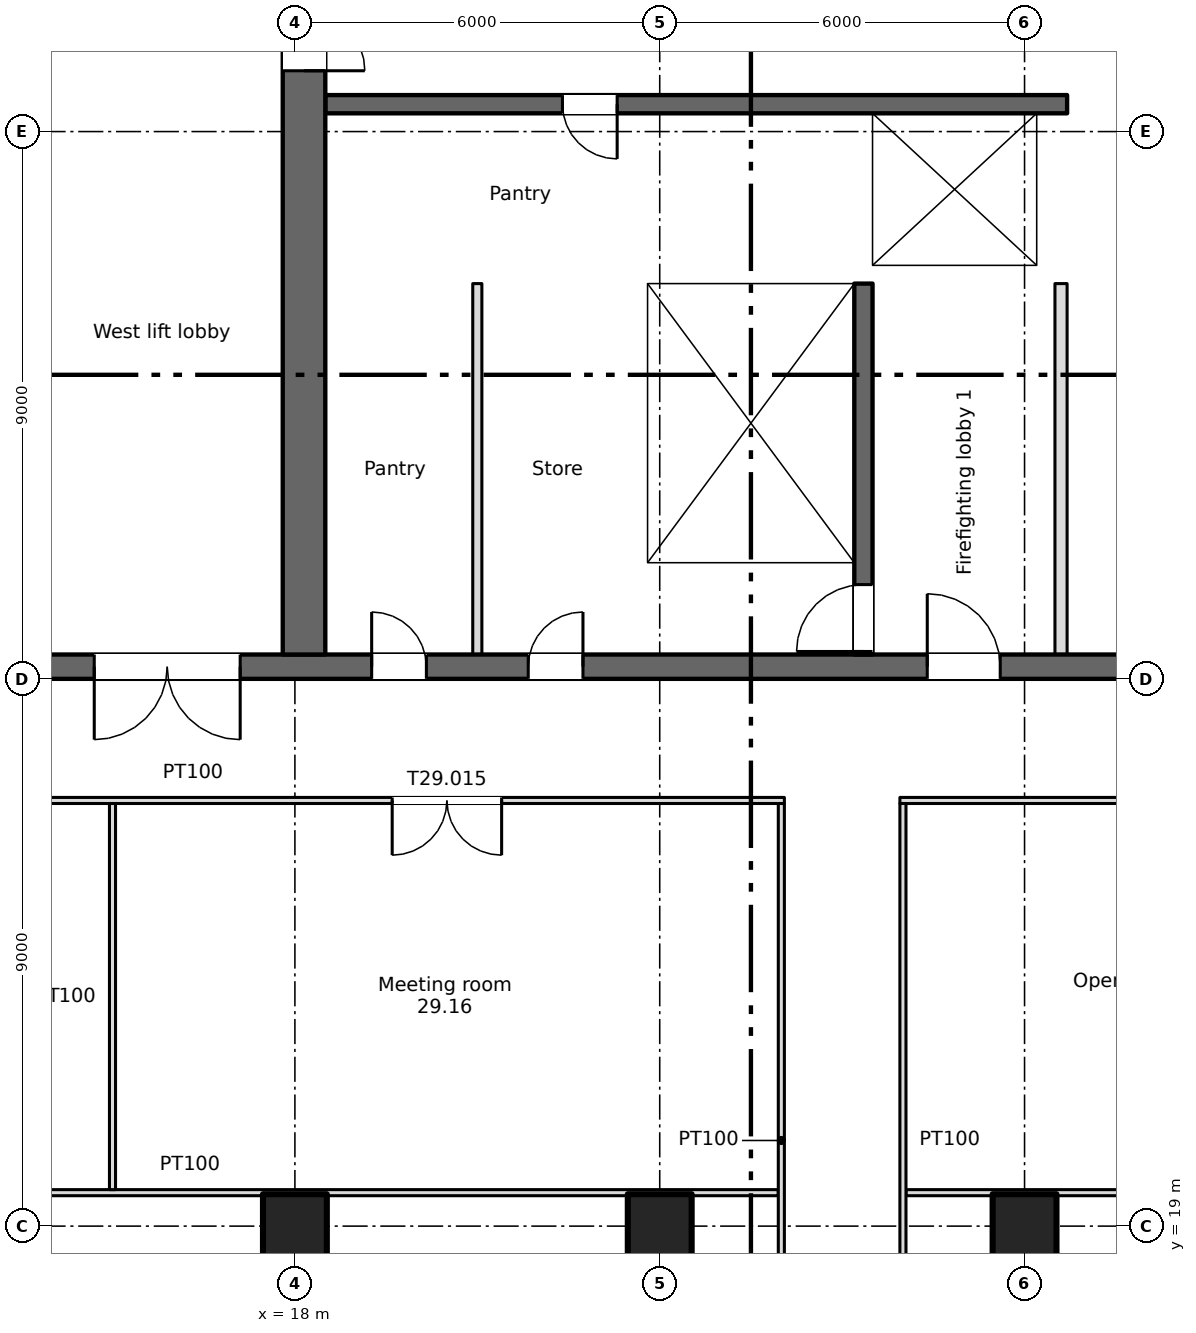
"""IFC4 building model, lengths in metres.
Left out: names, types, materials, properties, quantities, classifications, styles, units other than length and angle.
Written with IfcOpenShell. Run it as: python <this file> out.ifc"""

import sys

from ifc_helpers import new_model, si_unit, direction, frame, frame_2d, origin, origin_2d, place, context, subcontext, project, spatial, rectangle, extrude, element, fill, save


model = new_model("IFC4")
c1 = context("Model", 3, precision=1e-05, world=origin(), true_north=direction((0.0, 1.0)))
c2 = subcontext(c1, "Body", "Model", "MODEL_VIEW")
j1 = project(units=[si_unit("LENGTHUNIT", "METRE"), si_unit("PLANEANGLEUNIT", "RADIAN")], contexts=[c1])
p1 = place(None, origin())
s1 = spatial("IfcSite", under=j1, at=p1, CompositionType="ELEMENT")
p2 = place(p1, origin())
s2 = spatial("IfcBuilding", under=s1, at=p2, CompositionType="ELEMENT")
p3 = place(p2, frame((0.0, 0.0, 204.25)))
s3 = spatial("IfcBuildingStorey", under=s2, at=p3, CompositionType="ELEMENT", Elevation=204.25)
for number, where, z_axis, x_axis in (
    (1, (18.0, 19.0, 0.0), (0.0, 0.0, 1.0), (1.0, 0.0, 0.0)),
    (2, (24.0, 19.0, 0.0), (0.0, 0.0, 1.0), (1.0, 0.0, 0.0)),
    (3, (30.0, 19.0, 0.0), (0.0, 0.0, 1.0), (1.0, 0.0, 0.0)),
):
    element("IfcColumn", number, at=place(p3, frame(where, z_axis=z_axis, x_axis=x_axis)), inside=s3, PredefinedType="COLUMN", context=c2, shape_type="SweptSolid", body=[
        extrude(rectangle(XDim=1.05, YDim=1.05, at=origin_2d()), origin(), (0.0, 0.0, 1.0), 3.35),
    ])
p4 = place(p3, frame((6.6, 28.2, 0.0), z_axis=(0.0, 0.0, 1.0), x_axis=(1.0, 0.0, 0.0)))
e4 = element("IfcWall", 4, at=p4, inside=s3, PredefinedType="SHEAR", context=c2, shape_type="SweptSolid", body=[
    extrude(rectangle(XDim=57.9, YDim=0.4, at=frame_2d((28.95, 0.0))), origin(), (0.0, 0.0, 1.0), 3.35),
])
p5 = place(p4, frame((12.663, 0.0, 0.0)))
e5 = element("IfcOpeningElement", 5, at=p5, cuts=e4, PredefinedType="OPENING", context=c2, shape_type="SweptSolid", body=[
    extrude(rectangle(XDim=0.9, YDim=2.1, at=frame_2d((0.45, 1.05))), frame((0.0, 0.21, 0.0), z_axis=(0.0, -1.0, 0.0), x_axis=(1.0, 0.0, 0.0)), (0.0, 0.0, 1.0), 0.42),
])
p6 = place(p4, frame((15.238, 0.0, 0.0)))
e6 = element("IfcOpeningElement", 6, at=p6, cuts=e4, PredefinedType="OPENING", context=c2, shape_type="SweptSolid", body=[
    extrude(rectangle(XDim=0.9, YDim=2.1, at=frame_2d((0.45, 1.05))), frame((0.0, 0.21, 0.0), z_axis=(0.0, -1.0, 0.0), x_axis=(1.0, 0.0, 0.0)), (0.0, 0.0, 1.0), 0.42),
])
p7 = place(p4, frame((49.95, 0.0, 0.0)))
e7 = element("IfcOpeningElement", 7, at=p7, cuts=e4, PredefinedType="OPENING", context=c2, shape_type="SweptSolid", body=[
    extrude(rectangle(XDim=0.9, YDim=2.1, at=frame_2d((0.45, 1.05))), frame((0.0, 0.21, 0.0), z_axis=(0.0, -1.0, 0.0), x_axis=(1.0, 0.0, 0.0)), (0.0, 0.0, 1.0), 0.42),
])
p8 = place(p4, frame((0.663, 0.0, 0.0)))
e8 = element("IfcOpeningElement", 8, at=p8, cuts=e4, PredefinedType="OPENING", context=c2, shape_type="SweptSolid", body=[
    extrude(rectangle(XDim=0.9, YDim=2.1, at=frame_2d((0.45, 1.05))), frame((0.0, 0.21, 0.0), z_axis=(0.0, -1.0, 0.0), x_axis=(1.0, 0.0, 0.0)), (0.0, 0.0, 1.0), 0.42),
])
p9 = place(p4, frame((2.238, 0.0, 0.0)))
e9 = element("IfcOpeningElement", 9, at=p9, cuts=e4, PredefinedType="OPENING", context=c2, shape_type="SweptSolid", body=[
    extrude(rectangle(XDim=0.9, YDim=2.1, at=frame_2d((0.45, 1.05))), frame((0.0, 0.21, 0.0), z_axis=(0.0, -1.0, 0.0), x_axis=(1.0, 0.0, 0.0)), (0.0, 0.0, 1.0), 0.42),
])
p10 = place(p4, frame((4.8, 0.0, 0.0)))
e10 = element("IfcOpeningElement", 10, at=p10, cuts=e4, PredefinedType="OPENING", context=c2, shape_type="SweptSolid", body=[
    extrude(rectangle(XDim=1.2, YDim=2.1, at=frame_2d((0.6, 1.05))), frame((0.0, 0.21, 0.0), z_axis=(0.0, -1.0, 0.0), x_axis=(1.0, 0.0, 0.0)), (0.0, 0.0, 1.0), 0.42),
])
p11 = place(p4, frame((31.8, 0.0, 0.0)))
e11 = element("IfcOpeningElement", 11, at=p11, cuts=e4, PredefinedType="OPENING", context=c2, shape_type="SweptSolid", body=[
    extrude(rectangle(XDim=1.2, YDim=2.1, at=frame_2d((0.6, 1.05))), frame((0.0, 0.21, 0.0), z_axis=(0.0, -1.0, 0.0), x_axis=(1.0, 0.0, 0.0)), (0.0, 0.0, 1.0), 0.42),
])
p12 = place(p4, frame((55.3, 0.0, 0.0)))
e12 = element("IfcOpeningElement", 12, at=p12, cuts=e4, PredefinedType="OPENING", context=c2, shape_type="SweptSolid", body=[
    extrude(rectangle(XDim=1.2, YDim=2.1, at=frame_2d((0.6, 1.05))), frame((0.0, 0.21, 0.0), z_axis=(0.0, -1.0, 0.0), x_axis=(1.0, 0.0, 0.0)), (0.0, 0.0, 1.0), 0.42),
])
p13 = place(p4, frame((21.8, 0.0, 0.0)))
e13 = element("IfcOpeningElement", 13, at=p13, cuts=e4, PredefinedType="OPENING", context=c2, shape_type="SweptSolid", body=[
    extrude(rectangle(XDim=1.2, YDim=2.1, at=frame_2d((0.6, 1.05))), frame((0.0, 0.21, 0.0), z_axis=(0.0, -1.0, 0.0), x_axis=(1.0, 0.0, 0.0)), (0.0, 0.0, 1.0), 0.42),
])
p14 = place(p4, frame((41.8, 0.0, 0.0)))
e14 = element("IfcOpeningElement", 14, at=p14, cuts=e4, PredefinedType="OPENING", context=c2, shape_type="SweptSolid", body=[
    extrude(rectangle(XDim=1.2, YDim=2.1, at=frame_2d((0.6, 1.05))), frame((0.0, 0.21, 0.0), z_axis=(0.0, -1.0, 0.0), x_axis=(1.0, 0.0, 0.0)), (0.0, 0.0, 1.0), 0.42),
])
p15 = place(p4, frame((24.95, 0.0, 0.0)))
e15 = element("IfcOpeningElement", 15, at=p15, cuts=e4, PredefinedType="OPENING", context=c2, shape_type="SweptSolid", body=[
    extrude(rectangle(XDim=2.4, YDim=2.1, at=frame_2d((1.2, 1.05))), frame((0.0, 0.21, 0.0), z_axis=(0.0, -1.0, 0.0), x_axis=(1.0, 0.0, 0.0)), (0.0, 0.0, 1.0), 0.42),
])
p16 = place(p4, frame((37.45, 0.0, 0.0)))
e16 = element("IfcOpeningElement", 16, at=p16, cuts=e4, PredefinedType="OPENING", context=c2, shape_type="SweptSolid", body=[
    extrude(rectangle(XDim=2.4, YDim=2.1, at=frame_2d((1.2, 1.05))), frame((0.0, 0.21, 0.0), z_axis=(0.0, -1.0, 0.0), x_axis=(1.0, 0.0, 0.0)), (0.0, 0.0, 1.0), 0.42),
])
p17 = place(p4, frame((8.1, 0.0, 0.0)))
e17 = element("IfcOpeningElement", 17, at=p17, cuts=e4, PredefinedType="OPENING", context=c2, shape_type="SweptSolid", body=[
    extrude(rectangle(XDim=2.4, YDim=2.1, at=frame_2d((1.2, 1.05))), frame((0.0, 0.21, 0.0), z_axis=(0.0, -1.0, 0.0), x_axis=(1.0, 0.0, 0.0)), (0.0, 0.0, 1.0), 0.42),
])
p18 = place(p4, frame((28.95, 0.0, 0.0)))
e18 = element("IfcOpeningElement", 18, at=p18, cuts=e4, PredefinedType="OPENING", context=c2, shape_type="SweptSolid", body=[
    extrude(rectangle(XDim=0.9, YDim=2.1, at=frame_2d((0.45, 1.05))), frame((0.0, 0.21, 0.0), z_axis=(0.0, -1.0, 0.0), x_axis=(1.0, 0.0, 0.0)), (0.0, 0.0, 1.0), 0.42),
])
p19 = place(p4, frame((34.95, 0.0, 0.0)))
e19 = element("IfcOpeningElement", 19, at=p19, cuts=e4, PredefinedType="OPENING", context=c2, shape_type="SweptSolid", body=[
    extrude(rectangle(XDim=0.9, YDim=2.1, at=frame_2d((0.45, 1.05))), frame((0.0, 0.21, 0.0), z_axis=(0.0, -1.0, 0.0), x_axis=(1.0, 0.0, 0.0)), (0.0, 0.0, 1.0), 0.42),
])
p20 = place(p3, frame((18.15, 28.4, 0.0), z_axis=(0.0, 0.0, 1.0), x_axis=(0.0, 1.0, 0.0)))
e20 = element("IfcWall", 20, at=p20, inside=s3, PredefinedType="SHEAR", context=c2, shape_type="SweptSolid", body=[
    extrude(rectangle(XDim=16.9, YDim=0.7, at=frame_2d((8.45, 0.0))), origin(), (0.0, 0.0, 1.0), 3.35),
])
p21 = place(p20, frame((9.6, 0.0, 0.0)))
e21 = element("IfcOpeningElement", 21, at=p21, cuts=e20, PredefinedType="OPENING", context=c2, shape_type="SweptSolid", body=[
    extrude(rectangle(XDim=2.0, YDim=2.1, at=frame_2d((1.0, 1.05))), frame((0.0, 0.36, 0.0), z_axis=(0.0, -1.0, 0.0), x_axis=(1.0, 0.0, 0.0)), (0.0, 0.0, 1.0), 0.72),
])
p22 = place(p20, frame((15.4, 0.0, 0.0)))
e22 = element("IfcOpeningElement", 22, at=p22, cuts=e20, PredefinedType="OPENING", context=c2, shape_type="SweptSolid", body=[
    extrude(rectangle(XDim=1.2, YDim=2.1, at=frame_2d((0.6, 1.05))), frame((0.0, 0.36, 0.0), z_axis=(0.0, -1.0, 0.0), x_axis=(1.0, 0.0, 0.0)), (0.0, 0.0, 1.0), 0.72),
])
for number, where, z_axis, x_axis in (
    (23, (13.85, 28.4, 0.0), (0.0, 0.0, 1.0), (0.0, 1.0, 0.0)),
    (24, (23.65, 28.4, 0.0), (0.0, 0.0, 1.0), (0.0, 1.0, 0.0)),
):
    element("IfcWall", number, at=place(p3, frame(where, z_axis=z_axis, x_axis=x_axis)), inside=s3, PredefinedType="SHEAR", context=c2, shape_type="SweptSolid", body=[
        extrude(rectangle(XDim=6.1, YDim=0.3, at=frame_2d((3.05, 0.0))), origin(), (0.0, 0.0, 1.0), 3.35),
    ])
p23 = place(p3, frame((27.35, 28.4, 0.0), z_axis=(0.0, 0.0, 1.0), x_axis=(0.0, 1.0, 0.0)))
e25 = element("IfcWall", 25, at=p23, inside=s3, PredefinedType="SHEAR", context=c2, shape_type="SweptSolid", body=[
    extrude(rectangle(XDim=6.1, YDim=0.3, at=frame_2d((3.05, 0.0))), origin(), (0.0, 0.0, 1.0), 3.35),
])
p24 = place(p23, frame((0.05, 0.0, 0.0)))
e26 = element("IfcOpeningElement", 26, at=p24, cuts=e25, PredefinedType="OPENING", context=c2, shape_type="SweptSolid", body=[
    extrude(rectangle(XDim=1.1, YDim=2.1, at=frame_2d((0.55, 1.05))), frame((0.0, 0.16, 0.0), z_axis=(0.0, -1.0, 0.0), x_axis=(1.0, 0.0, 0.0)), (0.0, 0.0, 1.0), 0.32),
])
p25 = place(p3, frame((18.5, 34.65, 0.0), z_axis=(0.0, 0.0, 1.0), x_axis=(1.0, 0.0, 0.0)))
e27 = element("IfcWall", 27, at=p25, inside=s3, PredefinedType="SHEAR", context=c2, shape_type="SweptSolid", body=[
    extrude(rectangle(XDim=12.2, YDim=0.3, at=frame_2d((6.1, 0.0))), origin(), (0.0, 0.0, 1.0), 3.35),
])
p26 = place(p25, frame((9.8, 0.0, 0.0)))
e28 = element("IfcOpeningElement", 28, at=p26, cuts=e27, PredefinedType="OPENING", context=c2, shape_type="SweptSolid", body=[
    extrude(rectangle(XDim=1.1, YDim=2.1, at=frame_2d((0.55, 1.05))), frame((0.0, 0.16, 0.0), z_axis=(0.0, -1.0, 0.0), x_axis=(1.0, 0.0, 0.0)), (0.0, 0.0, 1.0), 0.32),
])
p27 = place(p3, frame((30.7, 37.45, 0.0), z_axis=(0.0, 0.0, 1.0), x_axis=(-1.0, 0.0, 0.0)))
e29 = element("IfcWall", 29, at=p27, inside=s3, PredefinedType="SHEAR", context=c2, shape_type="SweptSolid", body=[
    extrude(rectangle(XDim=12.2, YDim=0.3, at=frame_2d((6.1, 0.0))), origin(), (0.0, 0.0, 1.0), 3.35),
])
p28 = place(p27, frame((7.4, 0.0, 0.0)))
e30 = element("IfcOpeningElement", 30, at=p28, cuts=e29, PredefinedType="OPENING", context=c2, shape_type="SweptSolid", body=[
    extrude(rectangle(XDim=0.9, YDim=2.1, at=frame_2d((0.45, 1.05))), frame((0.0, 0.16, 0.0), z_axis=(0.0, -1.0, 0.0), x_axis=(1.0, 0.0, 0.0)), (0.0, 0.0, 1.0), 0.32),
])
p29 = place(p3, frame((27.35, 34.8, 0.0), z_axis=(0.0, 0.0, 1.0), x_axis=(0.0, 1.0, 0.0)))
e31 = element("IfcWall", 31, at=p29, inside=s3, PredefinedType="SHEAR", context=c2, shape_type="SweptSolid", body=[
    extrude(rectangle(XDim=2.5, YDim=0.3, at=frame_2d((1.25, 0.0))), origin(), (0.0, 0.0, 1.0), 3.35),
])
p30 = place(p3, frame((30.45, 34.8, 0.0), z_axis=(0.0, 0.0, 1.0), x_axis=(0.0, 1.0, 0.0)))
e32 = element("IfcWall", 32, at=p30, inside=s3, PredefinedType="SHEAR", context=c2, shape_type="SweptSolid", body=[
    extrude(rectangle(XDim=2.5, YDim=0.5, at=frame_2d((1.25, 0.0))), origin(), (0.0, 0.0, 1.0), 3.35),
])
p31 = place(p3, frame((13.85, 34.8, 0.0), z_axis=(0.0, 0.0, 1.0), x_axis=(0.0, 1.0, 0.0)))
e33 = element("IfcWall", 33, at=p31, inside=s3, PredefinedType="SHEAR", context=c2, shape_type="SweptSolid", body=[
    extrude(rectangle(XDim=2.5, YDim=0.3, at=frame_2d((1.25, 0.0))), origin(), (0.0, 0.0, 1.0), 3.35),
])
p32 = place(p3, frame((30.6, 28.4, 0.0), z_axis=(0.0, 0.0, 1.0), x_axis=(0.0, 1.0, 0.0)))
e34 = element("IfcWall", 34, at=p32, inside=s3, PredefinedType="PARTITIONING", context=c2, shape_type="SweptSolid", body=[
    extrude(rectangle(XDim=6.1, YDim=0.2, at=frame_2d((3.05, 0.0))), origin(), (0.0, 0.0, 1.0), 3.35),
])
p33 = place(p3, frame((21.0, 28.4, 0.0), z_axis=(0.0, 0.0, 1.0), x_axis=(0.0, 1.0, 0.0)))
e35 = element("IfcWall", 35, at=p33, inside=s3, PredefinedType="PARTITIONING", context=c2, shape_type="SweptSolid", body=[
    extrude(rectangle(XDim=6.1, YDim=0.15, at=frame_2d((3.05, 0.0))), origin(), (0.0, 0.0, 1.0), 3.35),
])
p34 = place(p3, frame((6.6, 19.55, 0.0), z_axis=(0.0, 0.0, 1.0), x_axis=(1.0, 0.0, 0.0)))
e36 = element("IfcWall", 36, at=p34, inside=s3, PredefinedType="PARTITIONING", context=c2, shape_type="SweptSolid", body=[
    extrude(rectangle(XDim=19.35, YDim=0.1, at=frame_2d((9.675, 0.0))), origin(), (0.0, 0.0, 1.0), 3.35),
])
p35 = place(p3, frame((28.05, 19.55, 0.0), z_axis=(0.0, 0.0, 1.0), x_axis=(1.0, 0.0, 0.0)))
e37 = element("IfcWall", 37, at=p35, inside=s3, PredefinedType="PARTITIONING", context=c2, shape_type="SweptSolid", body=[
    extrude(rectangle(XDim=21.9, YDim=0.1, at=frame_2d((10.95, 0.0))), origin(), (0.0, 0.0, 1.0), 3.35),
])
p36 = place(p3, frame((6.6, 26.0, 0.0), z_axis=(0.0, 0.0, 1.0), x_axis=(1.0, 0.0, 0.0)))
e38 = element("IfcWall", 38, at=p36, inside=s3, PredefinedType="PARTITIONING", context=c2, shape_type="SweptSolid", body=[
    extrude(rectangle(XDim=19.45, YDim=0.1, at=frame_2d((9.725, 0.0))), origin(), (0.0, 0.0, 1.0), 3.35),
])
p37 = place(p36, frame((3.7, 0.0, 0.0)))
e39 = element("IfcOpeningElement", 39, at=p37, cuts=e38, PredefinedType="OPENING", context=c2, shape_type="SweptSolid", body=[
    extrude(rectangle(XDim=1.0, YDim=2.1, at=frame_2d((0.5, 1.05))), frame((0.0, 0.06, 0.0), z_axis=(0.0, -1.0, 0.0), x_axis=(1.0, 0.0, 0.0)), (0.0, 0.0, 1.0), 0.12),
])
p38 = place(p36, frame((13.0, 0.0, 0.0)))
e40 = element("IfcOpeningElement", 40, at=p38, cuts=e38, PredefinedType="OPENING", context=c2, shape_type="SweptSolid", body=[
    extrude(rectangle(XDim=1.8, YDim=2.1, at=frame_2d((0.9, 1.05))), frame((0.0, 0.06, 0.0), z_axis=(0.0, -1.0, 0.0), x_axis=(1.0, 0.0, 0.0)), (0.0, 0.0, 1.0), 0.12),
])
p39 = place(p3, frame((27.95, 26.0, 0.0), z_axis=(0.0, 0.0, 1.0), x_axis=(1.0, 0.0, 0.0)))
e41 = element("IfcWall", 41, at=p39, inside=s3, PredefinedType="PARTITIONING", context=c2, shape_type="SweptSolid", body=[
    extrude(rectangle(XDim=22.1, YDim=0.1, at=frame_2d((11.05, 0.0))), origin(), (0.0, 0.0, 1.0), 3.35),
])
p40 = place(p39, frame((10.15, 0.0, 0.0)))
e42 = element("IfcOpeningElement", 42, at=p40, cuts=e41, PredefinedType="OPENING", context=c2, shape_type="SweptSolid", body=[
    extrude(rectangle(XDim=1.8, YDim=2.1, at=frame_2d((0.9, 1.05))), frame((0.0, 0.06, 0.0), z_axis=(0.0, -1.0, 0.0), x_axis=(1.0, 0.0, 0.0)), (0.0, 0.0, 1.0), 0.12),
])
p41 = place(p3, frame((15.0, 19.6, 0.0), z_axis=(0.0, 0.0, 1.0), x_axis=(0.0, 1.0, 0.0)))
e43 = element("IfcWall", 43, at=p41, inside=s3, PredefinedType="PARTITIONING", context=c2, shape_type="SweptSolid", body=[
    extrude(rectangle(XDim=6.35, YDim=0.1, at=frame_2d((3.175, 0.0))), origin(), (0.0, 0.0, 1.0), 3.35),
])
for number, where, z_axis, x_axis in (
    (44, (26.0, 12.65, 0.0), (0.0, 0.0, 1.0), (0.0, 1.0, 0.0)),
    (45, (28.0, 12.65, 0.0), (0.0, 0.0, 1.0), (0.0, 1.0, 0.0)),
):
    element("IfcWall", number, at=place(p3, frame(where, z_axis=z_axis, x_axis=x_axis)), inside=s3, PredefinedType="PARTITIONING", context=c2, shape_type="SweptSolid", body=[
        extrude(rectangle(XDim=13.3, YDim=0.1, at=frame_2d((6.65, 0.0))), origin(), (0.0, 0.0, 1.0), 3.35),
    ])
p42 = place(p5, origin())
e46 = element("IfcDoor", 46, at=p42, inside=s3, OperationType="SINGLE_SWING_LEFT", PredefinedType="DOOR", context=c2, shape_type="SweptSolid", body=[
    extrude(rectangle(XDim=0.9, YDim=2.1, at=frame_2d((0.45, 1.05))), frame((0.0, 0.025, 0.0), z_axis=(0.0, -1.0, 0.0), x_axis=(1.0, 0.0, 0.0)), (0.0, 0.0, 1.0), 0.05),
])
fill(e5, e46)
p43 = place(p6, origin())
e47 = element("IfcDoor", 47, at=p43, inside=s3, OperationType="SINGLE_SWING_RIGHT", PredefinedType="DOOR", context=c2, shape_type="SweptSolid", body=[
    extrude(rectangle(XDim=0.9, YDim=2.1, at=frame_2d((0.45, 1.05))), frame((0.0, 0.025, 0.0), z_axis=(0.0, -1.0, 0.0), x_axis=(1.0, 0.0, 0.0)), (0.0, 0.0, 1.0), 0.05),
])
fill(e6, e47)
p44 = place(p28, origin())
e48 = element("IfcDoor", 48, at=p44, inside=s3, OperationType="SINGLE_SWING_LEFT", PredefinedType="DOOR", context=c2, shape_type="SweptSolid", body=[
    extrude(rectangle(XDim=0.9, YDim=2.1, at=frame_2d((0.45, 1.05))), frame((0.0, 0.025, 0.0), z_axis=(0.0, -1.0, 0.0), x_axis=(1.0, 0.0, 0.0)), (0.0, 0.0, 1.0), 0.05),
])
fill(e30, e48)
p45 = place(p26, origin())
e49 = element("IfcDoor", 49, at=p45, inside=s3, OperationType="SLIDING_TO_LEFT", PredefinedType="DOOR", context=c2, shape_type="SweptSolid", body=[
    extrude(rectangle(XDim=1.1, YDim=2.1, at=frame_2d((0.55, 1.05))), frame((0.0, 0.025, 0.0), z_axis=(0.0, -1.0, 0.0), x_axis=(1.0, 0.0, 0.0)), (0.0, 0.0, 1.0), 0.05),
])
fill(e28, e49)
p46 = place(p24, origin())
e50 = element("IfcDoor", 50, at=p46, inside=s3, OperationType="SINGLE_SWING_LEFT", PredefinedType="DOOR", context=c2, shape_type="SweptSolid", body=[
    extrude(rectangle(XDim=1.1, YDim=2.1, at=frame_2d((0.55, 1.05))), frame((0.0, 0.025, 0.0), z_axis=(0.0, -1.0, 0.0), x_axis=(1.0, 0.0, 0.0)), (0.0, 0.0, 1.0), 0.05),
])
fill(e26, e50)
p47 = place(p13, origin())
e51 = element("IfcDoor", 51, at=p47, inside=s3, OperationType="SINGLE_SWING_LEFT", PredefinedType="DOOR", context=c2, shape_type="SweptSolid", body=[
    extrude(rectangle(XDim=1.2, YDim=2.1, at=frame_2d((0.6, 1.05))), frame((0.0, 0.025, 0.0), z_axis=(0.0, -1.0, 0.0), x_axis=(1.0, 0.0, 0.0)), (0.0, 0.0, 1.0), 0.05),
])
fill(e13, e51)
p48 = place(p17, origin())
e52 = element("IfcDoor", 52, at=p48, inside=s3, OperationType="DOUBLE_DOOR_SINGLE_SWING", PredefinedType="DOOR", context=c2, shape_type="SweptSolid", body=[
    extrude(rectangle(XDim=2.4, YDim=2.1, at=frame_2d((1.2, 1.05))), frame((0.0, 0.025, 0.0), z_axis=(0.0, -1.0, 0.0), x_axis=(1.0, 0.0, 0.0)), (0.0, 0.0, 1.0), 0.05),
])
fill(e17, e52)
p49 = place(p21, origin())
e53 = element("IfcDoor", 53, at=p49, inside=s3, OperationType="DOUBLE_DOOR_SINGLE_SWING", PredefinedType="DOOR", context=c2, shape_type="SweptSolid", body=[
    extrude(rectangle(XDim=2.0, YDim=2.1, at=frame_2d((1.0, 1.05))), frame((0.0, 0.025, 0.0), z_axis=(0.0, -1.0, 0.0), x_axis=(1.0, 0.0, 0.0)), (0.0, 0.0, 1.0), 0.05),
])
fill(e21, e53)
p50 = place(p38, origin())
e54 = element("IfcDoor", 54, at=p50, inside=s3, OperationType="DOUBLE_DOOR_SINGLE_SWING", PredefinedType="DOOR", context=c2, shape_type="SweptSolid", body=[
    extrude(rectangle(XDim=1.8, YDim=2.1, at=frame_2d((0.9, 1.05))), frame((0.0, 0.025, 0.0), z_axis=(0.0, -1.0, 0.0), x_axis=(1.0, 0.0, 0.0)), (0.0, 0.0, 1.0), 0.05),
])
fill(e40, e54)
save(model, sys.argv[1])
